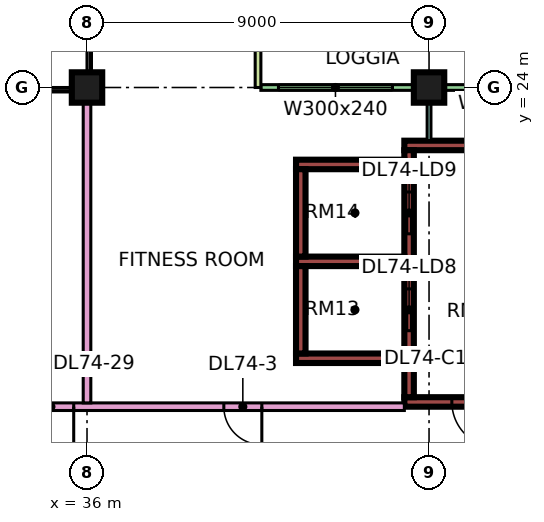
"""IFC4 building model, lengths in metres.
Left out: names, types, materials, properties, quantities, classifications, styles, units other than length and angle.
Written with IfcOpenShell. Run it as: python <this file> out.ifc"""

import sys

from ifc_helpers import new_model, si_unit, direction, frame, frame_2d, origin, origin_2d, place, context, subcontext, project, spatial, rectangle, extrude, element, fill, save


model = new_model("IFC4")
c1 = context("Model", 3, precision=1e-05, world=origin(), true_north=direction((0.0, 1.0)))
c2 = subcontext(c1, "Body", "Model", "MODEL_VIEW")
j1 = project(units=[si_unit("LENGTHUNIT", "METRE"), si_unit("PLANEANGLEUNIT", "RADIAN")], contexts=[c1])
p1 = place(None, origin())
s1 = spatial("IfcSite", under=j1, at=p1, CompositionType="ELEMENT")
p2 = place(p1, origin())
s2 = spatial("IfcBuilding", under=s1, at=p2, CompositionType="ELEMENT")
p3 = place(p2, frame((0.0, 0.0, 314.65)))
s3 = spatial("IfcBuildingStorey", under=s2, at=p3, CompositionType="ELEMENT", Elevation=314.65)
for number, where, z_axis, x_axis in (
    (1, (36.0, 24.0, 0.0), (0.0, 0.0, 1.0), (1.0, 0.0, 0.0)),
    (2, (45.0, 24.0, 0.0), (0.0, 0.0, 1.0), (1.0, 0.0, 0.0)),
):
    element("IfcColumn", number, at=place(p3, frame(where, z_axis=z_axis, x_axis=x_axis)), inside=s3, PredefinedType="COLUMN", context=c2, shape_type="SweptSolid", body=[
        extrude(rectangle(XDim=0.8, YDim=0.8, at=origin_2d()), origin(), (0.0, 0.0, 1.0), 3.75),
    ])
p4 = place(p3, frame((44.35, 15.725, 0.0), z_axis=(0.0, 0.0, 1.0), x_axis=(1.0, 0.0, 0.0)))
e3 = element("IfcWall", 3, at=p4, inside=s3, PredefinedType="SHEAR", context=c2, shape_type="SweptSolid", body=[
    extrude(rectangle(XDim=3.425, YDim=0.25, at=frame_2d((1.712, 0.0))), origin(), (0.0, 0.0, 1.0), 3.75),
])
p5 = place(p4, frame((1.25, 0.0, 0.0)))
e4 = element("IfcOpeningElement", 4, at=p5, cuts=e3, PredefinedType="OPENING", context=c2, shape_type="SweptSolid", body=[
    extrude(rectangle(XDim=1.2, YDim=2.2, at=frame_2d((0.6, 1.1))), frame((0.0, 0.135, 0.0), z_axis=(0.0, -1.0, 0.0), x_axis=(1.0, 0.0, 0.0)), (0.0, 0.0, 1.0), 0.27),
])
p6 = place(p3, frame((44.35, 22.475, 0.0), z_axis=(0.0, 0.0, 1.0), x_axis=(1.0, 0.0, 0.0)))
e5 = element("IfcWall", 5, at=p6, inside=s3, PredefinedType="SHEAR", context=c2, shape_type="SweptSolid", body=[
    extrude(rectangle(XDim=3.425, YDim=0.25, at=frame_2d((1.712, 0.0))), origin(), (0.0, 0.0, 1.0), 3.75),
])
p7 = place(p3, frame((44.475, 15.85, 0.0), z_axis=(0.0, 0.0, 1.0), x_axis=(0.0, 1.0, 0.0)))
e6 = element("IfcWall", 6, at=p7, inside=s3, PredefinedType="SHEAR", context=c2, shape_type="SweptSolid", body=[
    extrude(rectangle(XDim=6.5, YDim=0.25, at=frame_2d((3.25, 0.0))), origin(), (0.0, 0.0, 1.0), 3.75),
])
p8 = place(p7, frame((1.75, 0.0, 0.0)))
e7 = element("IfcOpeningElement", 7, at=p8, cuts=e6, PredefinedType="OPENING", context=c2, shape_type="SweptSolid", body=[
    extrude(rectangle(XDim=1.1, YDim=2.2, at=frame_2d((0.55, 1.1))), frame((0.0, 0.135, 0.0), z_axis=(0.0, -1.0, 0.0), x_axis=(1.0, 0.0, 0.0)), (0.0, 0.0, 1.0), 0.27),
])
p9 = place(p7, frame((4.3, 0.0, 0.0)))
e8 = element("IfcOpeningElement", 8, at=p9, cuts=e6, PredefinedType="OPENING", context=c2, shape_type="SweptSolid", body=[
    extrude(rectangle(XDim=1.1, YDim=2.2, at=frame_2d((0.55, 1.1))), frame((0.0, 0.135, 0.0), z_axis=(0.0, -1.0, 0.0), x_axis=(1.0, 0.0, 0.0)), (0.0, 0.0, 1.0), 0.27),
])
for number, where, z_axis, x_axis in (
    (9, (41.5, 16.875, 0.0), (0.0, 0.0, 1.0), (1.0, 0.0, 0.0)),
    (10, (41.5, 19.425, 0.0), (0.0, 0.0, 1.0), (1.0, 0.0, 0.0)),
    (11, (41.5, 21.975, 0.0), (0.0, 0.0, 1.0), (1.0, 0.0, 0.0)),
):
    element("IfcWall", number, at=place(p3, frame(where, z_axis=z_axis, x_axis=x_axis)), inside=s3, PredefinedType="SHEAR", context=c2, shape_type="SweptSolid", body=[
        extrude(rectangle(XDim=2.85, YDim=0.25, at=frame_2d((1.425, 0.0))), origin(), (0.0, 0.0, 1.0), 3.75),
    ])
for number, where, z_axis, x_axis in (
    (12, (41.625, 17.0, 0.0), (0.0, 0.0, 1.0), (0.0, 1.0, 0.0)),
    (13, (41.625, 19.55, 0.0), (0.0, 0.0, 1.0), (0.0, 1.0, 0.0)),
):
    element("IfcWall", number, at=place(p3, frame(where, z_axis=z_axis, x_axis=x_axis)), inside=s3, PredefinedType="SHEAR", context=c2, shape_type="SweptSolid", body=[
        extrude(rectangle(XDim=2.3, YDim=0.25, at=frame_2d((1.15, 0.0))), origin(), (0.0, 0.0, 1.0), 3.75),
    ])
p10 = place(p3, frame((47.925, 24.0, 0.0), z_axis=(0.0, 0.0, 1.0), x_axis=(-1.0, 0.0, 0.0)))
e14 = element("IfcWall", 14, at=p10, inside=s3, PredefinedType="SOLIDWALL", context=c2, shape_type="SweptSolid", body=[
    extrude(rectangle(XDim=7.35, YDim=0.15, at=frame_2d((3.675, 0.0))), origin(), (0.0, 0.0, 1.0), 3.35),
])
p11 = place(p10, frame((0.613, 0.0, 0.45)))
e15 = element("IfcOpeningElement", 15, at=p11, cuts=e14, PredefinedType="OPENING", context=c2, shape_type="SweptSolid", body=[
    extrude(rectangle(XDim=1.2, YDim=2.4, at=frame_2d((0.6, 1.2))), frame((0.0, 0.085, 0.0), z_axis=(0.0, -1.0, 0.0), x_axis=(1.0, 0.0, 0.0)), (0.0, 0.0, 1.0), 0.17),
])
p12 = place(p10, frame((3.887, 0.0, 0.45)))
e16 = element("IfcOpeningElement", 16, at=p12, cuts=e14, PredefinedType="OPENING", context=c2, shape_type="SweptSolid", body=[
    extrude(rectangle(XDim=3.0, YDim=2.4, at=frame_2d((1.5, 1.2))), frame((0.0, 0.085, 0.0), z_axis=(0.0, -1.0, 0.0), x_axis=(1.0, 0.0, 0.0)), (0.0, 0.0, 1.0), 0.17),
])
p13 = place(p3, frame((40.5, 25.5, 0.0), z_axis=(0.0, 0.0, 1.0), x_axis=(0.0, -1.0, 0.0)))
e17 = element("IfcWall", 17, at=p13, inside=s3, PredefinedType="SOLIDWALL", context=c2, shape_type="SweptSolid", body=[
    extrude(rectangle(XDim=1.5, YDim=0.15, at=frame_2d((0.75, 0.0))), origin(), (0.0, 0.0, 1.0), 3.35),
])
p14 = place(p3, frame((34.0, 15.6, 0.0), z_axis=(0.0, 0.0, 1.0), x_axis=(1.0, 0.0, 0.0)))
e18 = element("IfcWall", 18, at=p14, inside=s3, PredefinedType="PARTITIONING", context=c2, shape_type="SweptSolid", body=[
    extrude(rectangle(XDim=10.35, YDim=0.2, at=frame_2d((5.175, 0.0))), origin(), (0.0, 0.0, 1.0), 3.35),
])
p15 = place(p14, frame((5.6, 0.0, 0.0)))
e19 = element("IfcOpeningElement", 19, at=p15, cuts=e18, PredefinedType="OPENING", context=c2, shape_type="SweptSolid", body=[
    extrude(rectangle(XDim=1.0, YDim=2.1, at=frame_2d((0.5, 1.05))), frame((0.0, 0.11, 0.0), z_axis=(0.0, -1.0, 0.0), x_axis=(1.0, 0.0, 0.0)), (0.0, 0.0, 1.0), 0.22),
])
p16 = place(p14, frame((0.45, 0.0, 0.0)))
e20 = element("IfcOpeningElement", 20, at=p16, cuts=e18, PredefinedType="OPENING", context=c2, shape_type="SweptSolid", body=[
    extrude(rectangle(XDim=1.2, YDim=2.1, at=frame_2d((0.6, 1.05))), frame((0.0, 0.11, 0.0), z_axis=(0.0, -1.0, 0.0), x_axis=(1.0, 0.0, 0.0)), (0.0, 0.0, 1.0), 0.22),
])
p17 = place(p3, frame((36.0, 15.7, 0.0), z_axis=(0.0, 0.0, 1.0), x_axis=(0.0, 1.0, 0.0)))
e21 = element("IfcWall", 21, at=p17, inside=s3, PredefinedType="PARTITIONING", context=c2, shape_type="SweptSolid", body=[
    extrude(rectangle(XDim=8.3, YDim=0.2, at=frame_2d((4.15, 0.0))), origin(), (0.0, 0.0, 1.0), 3.35),
])
p18 = place(p3, frame((45.0, 22.6, 0.0), z_axis=(0.0, 0.0, 1.0), x_axis=(0.0, 1.0, 0.0)))
e22 = element("IfcWall", 22, at=p18, inside=s3, PredefinedType="PARTITIONING", context=c2, shape_type="SweptSolid", body=[
    extrude(rectangle(XDim=1.326, YDim=0.1, at=frame_2d((0.663, 0.0))), origin(), (0.0, 0.0, 1.0), 3.35),
])
p19 = place(p12, origin())
e23 = element("IfcWindow", 23, at=p19, inside=s3, PartitioningType="SINGLE_PANEL", PredefinedType="WINDOW", context=c2, shape_type="SweptSolid", body=[
    extrude(rectangle(XDim=3.0, YDim=2.4, at=frame_2d((1.5, 1.2))), frame((0.0, 0.03, 0.0), z_axis=(0.0, -1.0, 0.0), x_axis=(1.0, 0.0, 0.0)), (0.0, 0.0, 1.0), 0.06),
])
fill(e16, e23)
p20 = place(p5, origin())
e24 = element("IfcDoor", 24, at=p20, inside=s3, OperationType="SINGLE_SWING_RIGHT", PredefinedType="DOOR", context=c2, shape_type="SweptSolid", body=[
    extrude(rectangle(XDim=1.2, YDim=2.2, at=frame_2d((0.6, 1.1))), frame((0.0, 0.025, 0.0), z_axis=(0.0, -1.0, 0.0), x_axis=(1.0, 0.0, 0.0)), (0.0, 0.0, 1.0), 0.05),
])
fill(e4, e24)
p21 = place(p8, origin())
e25 = element("IfcDoor", 25, at=p21, inside=s3, OperationType="DOUBLE_DOOR_SLIDING", PredefinedType="DOOR", context=c2, shape_type="SweptSolid", body=[
    extrude(rectangle(XDim=1.1, YDim=2.2, at=frame_2d((0.55, 1.1))), frame((0.0, 0.025, 0.0), z_axis=(0.0, -1.0, 0.0), x_axis=(1.0, 0.0, 0.0)), (0.0, 0.0, 1.0), 0.05),
])
fill(e7, e25)
p22 = place(p9, origin())
e26 = element("IfcDoor", 26, at=p22, inside=s3, OperationType="DOUBLE_DOOR_SLIDING", PredefinedType="DOOR", context=c2, shape_type="SweptSolid", body=[
    extrude(rectangle(XDim=1.1, YDim=2.2, at=frame_2d((0.55, 1.1))), frame((0.0, 0.025, 0.0), z_axis=(0.0, -1.0, 0.0), x_axis=(1.0, 0.0, 0.0)), (0.0, 0.0, 1.0), 0.05),
])
fill(e8, e26)
p23 = place(p15, origin())
e27 = element("IfcDoor", 27, at=p23, inside=s3, OperationType="SINGLE_SWING_RIGHT", PredefinedType="DOOR", context=c2, shape_type="SweptSolid", body=[
    extrude(rectangle(XDim=1.0, YDim=2.1, at=frame_2d((0.5, 1.05))), frame((0.0, 0.025, 0.0), z_axis=(0.0, -1.0, 0.0), x_axis=(1.0, 0.0, 0.0)), (0.0, 0.0, 1.0), 0.05),
])
fill(e19, e27)
p24 = place(p16, origin())
e28 = element("IfcDoor", 28, at=p24, inside=s3, OperationType="SINGLE_SWING_RIGHT", PredefinedType="DOOR", context=c2, shape_type="SweptSolid", body=[
    extrude(rectangle(XDim=1.2, YDim=2.1, at=frame_2d((0.6, 1.05))), frame((0.0, 0.025, 0.0), z_axis=(0.0, -1.0, 0.0), x_axis=(1.0, 0.0, 0.0)), (0.0, 0.0, 1.0), 0.05),
])
fill(e20, e28)
save(model, sys.argv[1])
